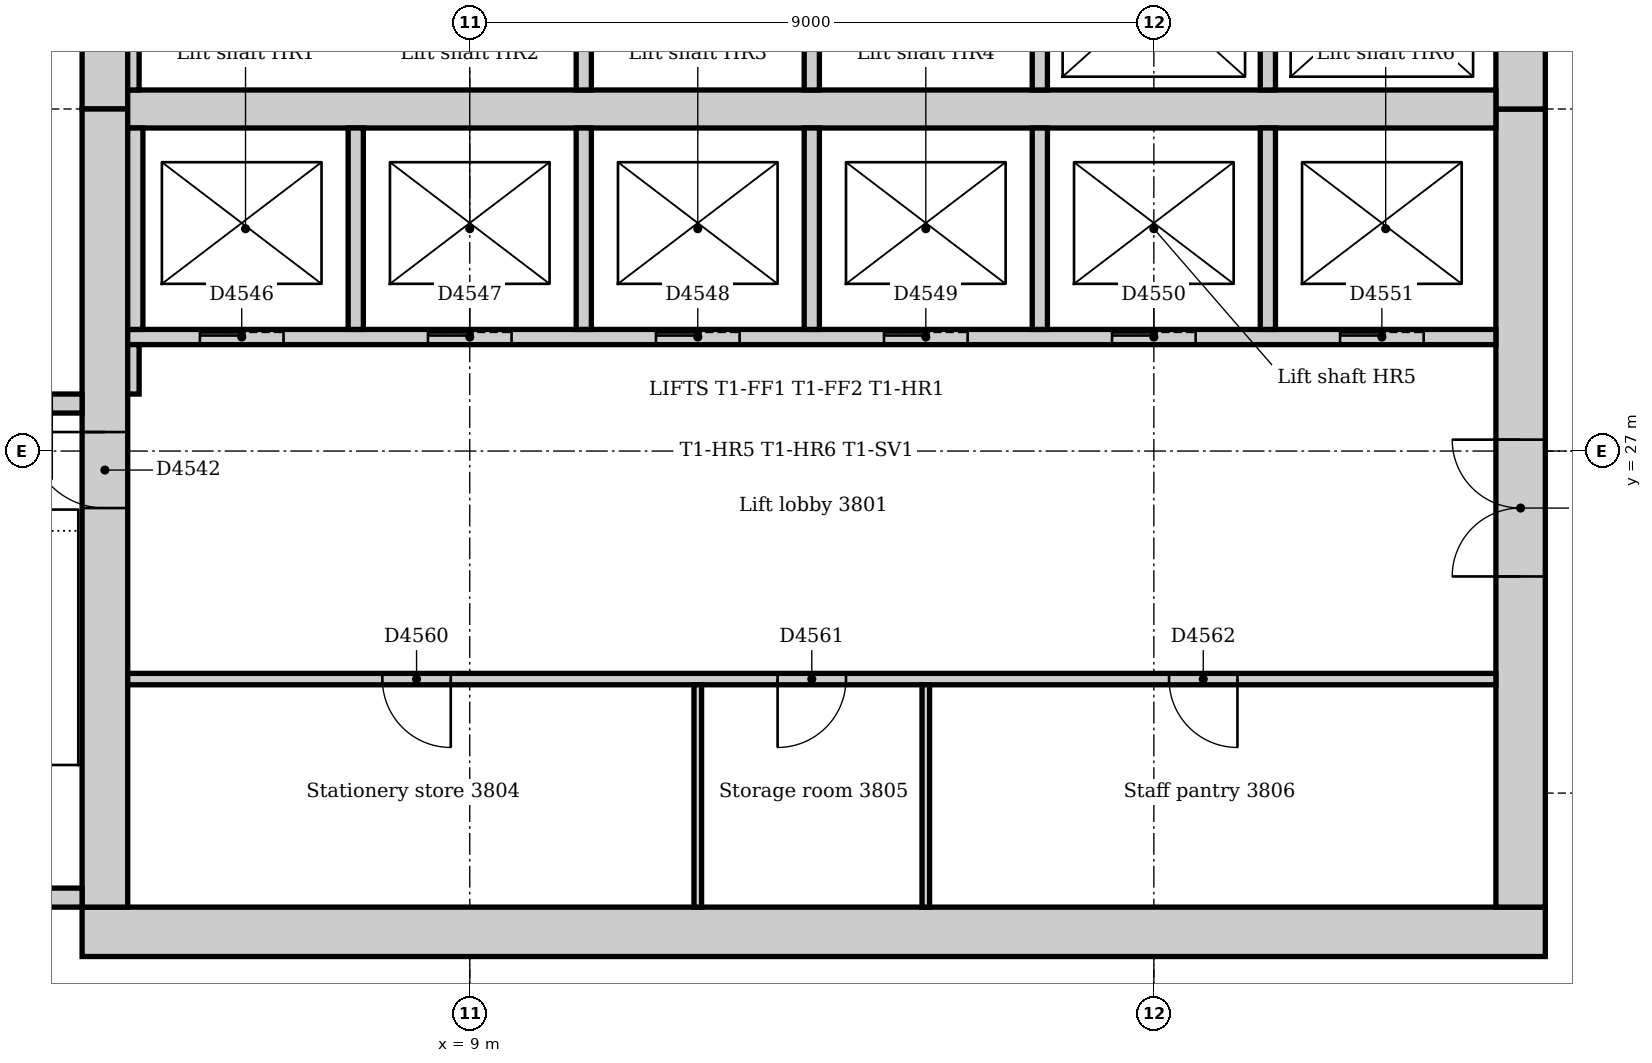
"""IFC4 building model, lengths in metres.
Left out: names, types, materials, properties, quantities, classifications, styles, units other than length and angle.
Written with IfcOpenShell. Run it as: python <this file> out.ifc"""

import sys

from ifc_helpers import new_model, si_unit, direction, frame, frame_2d, origin, place, context, subcontext, project, spatial, rectangle, extrude, element, fill, save


model = new_model("IFC4")
c1 = context("Model", 3, precision=1e-05, world=origin(), true_north=direction((0.0, 1.0)))
c2 = subcontext(c1, "Body", "Model", "MODEL_VIEW")
j1 = project(units=[si_unit("LENGTHUNIT", "METRE"), si_unit("PLANEANGLEUNIT", "RADIAN")], contexts=[c1])
p1 = place(None, origin())
s1 = spatial("IfcSite", under=j1, at=p1, CompositionType="ELEMENT")
p2 = place(p1, origin())
s2 = spatial("IfcBuilding", under=s1, at=p2, CompositionType="ELEMENT")
p3 = place(p2, frame((0.0, 0.0, 161.0)))
s3 = spatial("IfcBuildingStorey", under=s2, at=p3, CompositionType="ELEMENT", Elevation=161.0)
p4 = place(p3, frame((3.9, 20.675, 0.0), z_axis=(0.0, 0.0, 1.0), x_axis=(1.0, 0.0, 0.0)))
e1 = element("IfcWall", 1, at=p4, inside=s3, PredefinedType="SOLIDWALL", context=c2, shape_type="SweptSolid", body=[
    extrude(rectangle(XDim=19.25, YDim=0.65, at=frame_2d((9.625, 0.0))), origin(), (0.0, 0.0, 1.0), 4.0),
])
p5 = place(p3, frame((22.825, 21.0, 0.0), z_axis=(0.0, 0.0, 1.0), x_axis=(0.0, 1.0, 0.0)))
e2 = element("IfcWall", 2, at=p5, inside=s3, PredefinedType="SOLIDWALL", context=c2, shape_type="SweptSolid", body=[
    extrude(rectangle(XDim=10.5, YDim=0.65, at=frame_2d((5.25, 0.0))), origin(), (0.0, 0.0, 1.0), 4.0),
])
p6 = place(p5, frame((4.35, 0.0, 0.0)))
e3 = element("IfcOpeningElement", 3, at=p6, cuts=e2, PredefinedType="OPENING", context=c2, shape_type="SweptSolid", body=[
    extrude(rectangle(XDim=1.8, YDim=2.1, at=frame_2d((0.9, 1.05))), frame((0.0, 0.335, 0.0), z_axis=(0.0, -1.0, 0.0), x_axis=(1.0, 0.0, 0.0)), (0.0, 0.0, 1.0), 0.67),
])
p7 = place(p3, frame((22.825, 31.5, 0.0), z_axis=(0.0, 0.0, 1.0), x_axis=(0.0, 1.0, 0.0)))
e4 = element("IfcWall", 4, at=p7, inside=s3, PredefinedType="SOLIDWALL", context=c2, shape_type="SweptSolid", body=[
    extrude(rectangle(XDim=10.5, YDim=0.65, at=frame_2d((5.25, 0.0))), origin(), (0.0, 0.0, 1.0), 4.0),
])
p8 = place(p7, frame((3.15, 0.0, 0.0)))
e5 = element("IfcOpeningElement", 5, at=p8, cuts=e4, PredefinedType="OPENING", context=c2, shape_type="SweptSolid", body=[
    extrude(rectangle(XDim=1.0, YDim=2.1, at=frame_2d((0.5, 1.05))), frame((0.0, 0.335, 0.0), z_axis=(0.0, -1.0, 0.0), x_axis=(1.0, 0.0, 0.0)), (0.0, 0.0, 1.0), 0.67),
])
p9 = place(p7, frame((5.2, 0.0, 0.0)))
e6 = element("IfcOpeningElement", 6, at=p9, cuts=e4, PredefinedType="OPENING", context=c2, shape_type="SweptSolid", body=[
    extrude(rectangle(XDim=1.0, YDim=2.1, at=frame_2d((0.5, 1.05))), frame((0.0, 0.335, 0.0), z_axis=(0.0, -1.0, 0.0), x_axis=(1.0, 0.0, 0.0)), (0.0, 0.0, 1.0), 0.67),
])
p10 = place(p3, frame((4.2, 42.0, 0.0), z_axis=(0.0, 0.0, 1.0), x_axis=(0.0, -1.0, 0.0)))
e7 = element("IfcWall", 7, at=p10, inside=s3, PredefinedType="SOLIDWALL", context=c2, shape_type="SweptSolid", body=[
    extrude(rectangle(XDim=10.5, YDim=0.6, at=frame_2d((5.25, 0.0))), origin(), (0.0, 0.0, 1.0), 4.0),
])
p11 = place(p10, frame((5.3, 0.0, 0.0)))
e8 = element("IfcOpeningElement", 8, at=p11, cuts=e7, PredefinedType="OPENING", context=c2, shape_type="SweptSolid", body=[
    extrude(rectangle(XDim=1.0, YDim=2.1, at=frame_2d((0.5, 1.05))), frame((0.0, 0.31, 0.0), z_axis=(0.0, -1.0, 0.0), x_axis=(1.0, 0.0, 0.0)), (0.0, 0.0, 1.0), 0.62),
])
p12 = place(p3, frame((4.2, 31.5, 0.0), z_axis=(0.0, 0.0, 1.0), x_axis=(0.0, -1.0, 0.0)))
e9 = element("IfcWall", 9, at=p12, inside=s3, PredefinedType="SOLIDWALL", context=c2, shape_type="SweptSolid", body=[
    extrude(rectangle(XDim=10.5, YDim=0.6, at=frame_2d((5.25, 0.0))), origin(), (0.0, 0.0, 1.0), 4.0),
])
p13 = place(p12, frame((4.25, 0.0, 0.0)))
e10 = element("IfcOpeningElement", 10, at=p13, cuts=e9, PredefinedType="OPENING", context=c2, shape_type="SweptSolid", body=[
    extrude(rectangle(XDim=1.0, YDim=2.1, at=frame_2d((0.5, 1.05))), frame((0.0, 0.31, 0.0), z_axis=(0.0, -1.0, 0.0), x_axis=(1.0, 0.0, 0.0)), (0.0, 0.0, 1.0), 0.62),
])
p14 = place(p3, frame((4.5, 31.5, 0.0), z_axis=(0.0, 0.0, 1.0), x_axis=(1.0, 0.0, 0.0)))
e11 = element("IfcWall", 11, at=p14, inside=s3, PredefinedType="SOLIDWALL", context=c2, shape_type="SweptSolid", body=[
    extrude(rectangle(XDim=18.0, YDim=0.5, at=frame_2d((9.0, 0.0))), origin(), (0.0, 0.0, 1.0), 4.0),
])
p15 = place(p3, frame((0.36, 21.125, 0.0), z_axis=(0.0, 0.0, 1.0), x_axis=(1.0, 0.0, 0.0)))
e12 = element("IfcWall", 12, at=p15, inside=s3, PredefinedType="SOLIDWALL", context=c2, shape_type="SweptSolid", body=[
    extrude(rectangle(XDim=3.54, YDim=0.25, at=frame_2d((1.77, 0.0))), origin(), (0.0, 0.0, 1.0), 4.0),
])
p16 = place(p3, frame((3.9, 27.625, 0.0), z_axis=(0.0, 0.0, 1.0), x_axis=(-1.0, 0.0, 0.0)))
e13 = element("IfcWall", 13, at=p16, inside=s3, PredefinedType="SOLIDWALL", context=c2, shape_type="SweptSolid", body=[
    extrude(rectangle(XDim=3.54, YDim=0.25, at=frame_2d((1.77, 0.0))), origin(), (0.0, 0.0, 1.0), 4.0),
])
p17 = place(p16, frame((0.4, 0.0, 0.0)))
e14 = element("IfcOpeningElement", 14, at=p17, cuts=e13, PredefinedType="OPENING", context=c2, shape_type="SweptSolid", body=[
    extrude(rectangle(XDim=1.0, YDim=2.1, at=frame_2d((0.5, 1.05))), frame((0.0, 0.135, 0.0), z_axis=(0.0, -1.0, 0.0), x_axis=(1.0, 0.0, 0.0)), (0.0, 0.0, 1.0), 0.27),
])
p18 = place(p3, frame((4.5, 28.5, 0.0), z_axis=(0.0, 0.0, 1.0), x_axis=(1.0, 0.0, 0.0)))
e15 = element("IfcWall", 15, at=p18, inside=s3, PredefinedType="PARTITIONING", context=c2, shape_type="SweptSolid", body=[
    extrude(rectangle(XDim=18.0, YDim=0.2, at=frame_2d((9.0, 0.0))), origin(), (0.0, 0.0, 1.0), 3.85),
])
p19 = place(p18, frame((0.95, 0.0, 0.0)))
e16 = element("IfcOpeningElement", 16, at=p19, cuts=e15, PredefinedType="OPENING", context=c2, shape_type="SweptSolid", body=[
    extrude(rectangle(XDim=1.1, YDim=2.1, at=frame_2d((0.55, 1.05))), frame((0.0, 0.11, 0.0), z_axis=(0.0, -1.0, 0.0), x_axis=(1.0, 0.0, 0.0)), (0.0, 0.0, 1.0), 0.22),
])
p20 = place(p18, frame((3.95, 0.0, 0.0)))
e17 = element("IfcOpeningElement", 17, at=p20, cuts=e15, PredefinedType="OPENING", context=c2, shape_type="SweptSolid", body=[
    extrude(rectangle(XDim=1.1, YDim=2.1, at=frame_2d((0.55, 1.05))), frame((0.0, 0.11, 0.0), z_axis=(0.0, -1.0, 0.0), x_axis=(1.0, 0.0, 0.0)), (0.0, 0.0, 1.0), 0.22),
])
p21 = place(p18, frame((6.95, 0.0, 0.0)))
e18 = element("IfcOpeningElement", 18, at=p21, cuts=e15, PredefinedType="OPENING", context=c2, shape_type="SweptSolid", body=[
    extrude(rectangle(XDim=1.1, YDim=2.1, at=frame_2d((0.55, 1.05))), frame((0.0, 0.11, 0.0), z_axis=(0.0, -1.0, 0.0), x_axis=(1.0, 0.0, 0.0)), (0.0, 0.0, 1.0), 0.22),
])
p22 = place(p18, frame((9.95, 0.0, 0.0)))
e19 = element("IfcOpeningElement", 19, at=p22, cuts=e15, PredefinedType="OPENING", context=c2, shape_type="SweptSolid", body=[
    extrude(rectangle(XDim=1.1, YDim=2.1, at=frame_2d((0.55, 1.05))), frame((0.0, 0.11, 0.0), z_axis=(0.0, -1.0, 0.0), x_axis=(1.0, 0.0, 0.0)), (0.0, 0.0, 1.0), 0.22),
])
p23 = place(p18, frame((12.95, 0.0, 0.0)))
e20 = element("IfcOpeningElement", 20, at=p23, cuts=e15, PredefinedType="OPENING", context=c2, shape_type="SweptSolid", body=[
    extrude(rectangle(XDim=1.1, YDim=2.1, at=frame_2d((0.55, 1.05))), frame((0.0, 0.11, 0.0), z_axis=(0.0, -1.0, 0.0), x_axis=(1.0, 0.0, 0.0)), (0.0, 0.0, 1.0), 0.22),
])
p24 = place(p18, frame((15.95, 0.0, 0.0)))
e21 = element("IfcOpeningElement", 21, at=p24, cuts=e15, PredefinedType="OPENING", context=c2, shape_type="SweptSolid", body=[
    extrude(rectangle(XDim=1.1, YDim=2.1, at=frame_2d((0.55, 1.05))), frame((0.0, 0.11, 0.0), z_axis=(0.0, -1.0, 0.0), x_axis=(1.0, 0.0, 0.0)), (0.0, 0.0, 1.0), 0.22),
])
for number, where, z_axis, x_axis in (
    (22, (10.5, 28.6, 0.0), (0.0, 0.0, 1.0), (0.0, 1.0, 0.0)),
    (23, (10.5, 31.75, 0.0), (0.0, 0.0, 1.0), (0.0, 1.0, 0.0)),
    (24, (13.5, 28.6, 0.0), (0.0, 0.0, 1.0), (0.0, 1.0, 0.0)),
    (25, (13.5, 31.75, 0.0), (0.0, 0.0, 1.0), (0.0, 1.0, 0.0)),
    (26, (16.5, 28.6, 0.0), (0.0, 0.0, 1.0), (0.0, 1.0, 0.0)),
    (27, (16.5, 31.75, 0.0), (0.0, 0.0, 1.0), (0.0, 1.0, 0.0)),
    (28, (19.5, 28.6, 0.0), (0.0, 0.0, 1.0), (0.0, 1.0, 0.0)),
    (29, (19.5, 31.75, 0.0), (0.0, 0.0, 1.0), (0.0, 1.0, 0.0)),
    (30, (4.6, 28.6, 0.0), (0.0, 0.0, 1.0), (0.0, 1.0, 0.0)),
    (31, (7.5, 28.6, 0.0), (0.0, 0.0, 1.0), (0.0, 1.0, 0.0)),
):
    element("IfcWall", number, at=place(p3, frame(where, z_axis=z_axis, x_axis=x_axis)), inside=s3, PredefinedType="PARTITIONING", context=c2, shape_type="SweptSolid", body=[
        extrude(rectangle(XDim=2.65, YDim=0.2, at=frame_2d((1.325, 0.0))), origin(), (0.0, 0.0, 1.0), 3.85),
    ])
p25 = place(p3, frame((4.5, 24.0, 0.0), z_axis=(0.0, 0.0, 1.0), x_axis=(1.0, 0.0, 0.0)))
e32 = element("IfcWall", 32, at=p25, inside=s3, PredefinedType="PARTITIONING", context=c2, shape_type="SweptSolid", body=[
    extrude(rectangle(XDim=18.0, YDim=0.15, at=frame_2d((9.0, 0.0))), origin(), (0.0, 0.0, 1.0), 3.85),
])
p26 = place(p25, frame((3.35, 0.0, 0.0)))
e33 = element("IfcOpeningElement", 33, at=p26, cuts=e32, PredefinedType="OPENING", context=c2, shape_type="SweptSolid", body=[
    extrude(rectangle(XDim=0.9, YDim=2.1, at=frame_2d((0.45, 1.05))), frame((0.0, 0.085, 0.0), z_axis=(0.0, -1.0, 0.0), x_axis=(1.0, 0.0, 0.0)), (0.0, 0.0, 1.0), 0.17),
])
p27 = place(p25, frame((8.55, 0.0, 0.0)))
e34 = element("IfcOpeningElement", 34, at=p27, cuts=e32, PredefinedType="OPENING", context=c2, shape_type="SweptSolid", body=[
    extrude(rectangle(XDim=0.9, YDim=2.1, at=frame_2d((0.45, 1.05))), frame((0.0, 0.085, 0.0), z_axis=(0.0, -1.0, 0.0), x_axis=(1.0, 0.0, 0.0)), (0.0, 0.0, 1.0), 0.17),
])
p28 = place(p25, frame((13.7, 0.0, 0.0)))
e35 = element("IfcOpeningElement", 35, at=p28, cuts=e32, PredefinedType="OPENING", context=c2, shape_type="SweptSolid", body=[
    extrude(rectangle(XDim=0.9, YDim=2.1, at=frame_2d((0.45, 1.05))), frame((0.0, 0.085, 0.0), z_axis=(0.0, -1.0, 0.0), x_axis=(1.0, 0.0, 0.0)), (0.0, 0.0, 1.0), 0.17),
])
p29 = place(p3, frame((4.575, 31.75, 0.0), z_axis=(0.0, 0.0, 1.0), x_axis=(0.0, 1.0, 0.0)))
e36 = element("IfcWall", 36, at=p29, inside=s3, PredefinedType="PARTITIONING", context=c2, shape_type="SweptSolid", body=[
    extrude(rectangle(XDim=2.675, YDim=0.15, at=frame_2d((1.337, 0.0))), origin(), (0.0, 0.0, 1.0), 3.85),
])
p30 = place(p3, frame((4.575, 27.75, 0.0), z_axis=(0.0, 0.0, 1.0), x_axis=(0.0, 1.0, 0.0)))
e37 = element("IfcWall", 37, at=p30, inside=s3, PredefinedType="PARTITIONING", context=c2, shape_type="SweptSolid", body=[
    extrude(rectangle(XDim=0.65, YDim=0.15, at=frame_2d((0.325, 0.0))), origin(), (0.0, 0.0, 1.0), 3.85),
])
for number, where, z_axis, x_axis in (
    (38, (12.0, 21.0, 0.0), (0.0, 0.0, 1.0), (0.0, 1.0, 0.0)),
    (39, (15.0, 21.0, 0.0), (0.0, 0.0, 1.0), (0.0, 1.0, 0.0)),
):
    element("IfcWall", number, at=place(p3, frame(where, z_axis=z_axis, x_axis=x_axis)), inside=s3, PredefinedType="PARTITIONING", context=c2, shape_type="SweptSolid", body=[
        extrude(rectangle(XDim=2.925, YDim=0.1, at=frame_2d((1.462, 0.0))), origin(), (0.0, 0.0, 1.0), 3.85),
    ])
p31 = place(p13, frame((1.0, 0.0, 0.0), z_axis=(0.0, 0.0, 1.0), x_axis=(-1.0, 0.0, 0.0)))
e40 = element("IfcDoor", 40, at=p31, inside=s3, OperationType="SINGLE_SWING_RIGHT", PredefinedType="DOOR", context=c2, shape_type="SweptSolid", body=[
    extrude(rectangle(XDim=1.0, YDim=2.1, at=frame_2d((0.5, 1.05))), frame((0.0, 0.025, 0.0), z_axis=(0.0, -1.0, 0.0), x_axis=(1.0, 0.0, 0.0)), (0.0, 0.0, 1.0), 0.05),
])
fill(e10, e40)
p32 = place(p19, origin())
e41 = element("IfcDoor", 41, at=p32, inside=s3, OperationType="SLIDING_TO_LEFT", PredefinedType="DOOR", context=c2, shape_type="SweptSolid", body=[
    extrude(rectangle(XDim=1.1, YDim=2.1, at=frame_2d((0.55, 1.05))), frame((0.0, 0.025, 0.0), z_axis=(0.0, -1.0, 0.0), x_axis=(1.0, 0.0, 0.0)), (0.0, 0.0, 1.0), 0.05),
])
fill(e16, e41)
p33 = place(p20, origin())
e42 = element("IfcDoor", 42, at=p33, inside=s3, OperationType="SLIDING_TO_LEFT", PredefinedType="DOOR", context=c2, shape_type="SweptSolid", body=[
    extrude(rectangle(XDim=1.1, YDim=2.1, at=frame_2d((0.55, 1.05))), frame((0.0, 0.025, 0.0), z_axis=(0.0, -1.0, 0.0), x_axis=(1.0, 0.0, 0.0)), (0.0, 0.0, 1.0), 0.05),
])
fill(e17, e42)
p34 = place(p21, origin())
e43 = element("IfcDoor", 43, at=p34, inside=s3, OperationType="SLIDING_TO_LEFT", PredefinedType="DOOR", context=c2, shape_type="SweptSolid", body=[
    extrude(rectangle(XDim=1.1, YDim=2.1, at=frame_2d((0.55, 1.05))), frame((0.0, 0.025, 0.0), z_axis=(0.0, -1.0, 0.0), x_axis=(1.0, 0.0, 0.0)), (0.0, 0.0, 1.0), 0.05),
])
fill(e18, e43)
p35 = place(p22, origin())
e44 = element("IfcDoor", 44, at=p35, inside=s3, OperationType="SLIDING_TO_LEFT", PredefinedType="DOOR", context=c2, shape_type="SweptSolid", body=[
    extrude(rectangle(XDim=1.1, YDim=2.1, at=frame_2d((0.55, 1.05))), frame((0.0, 0.025, 0.0), z_axis=(0.0, -1.0, 0.0), x_axis=(1.0, 0.0, 0.0)), (0.0, 0.0, 1.0), 0.05),
])
fill(e19, e44)
p36 = place(p23, origin())
e45 = element("IfcDoor", 45, at=p36, inside=s3, OperationType="SLIDING_TO_LEFT", PredefinedType="DOOR", context=c2, shape_type="SweptSolid", body=[
    extrude(rectangle(XDim=1.1, YDim=2.1, at=frame_2d((0.55, 1.05))), frame((0.0, 0.025, 0.0), z_axis=(0.0, -1.0, 0.0), x_axis=(1.0, 0.0, 0.0)), (0.0, 0.0, 1.0), 0.05),
])
fill(e20, e45)
p37 = place(p24, origin())
e46 = element("IfcDoor", 46, at=p37, inside=s3, OperationType="SLIDING_TO_LEFT", PredefinedType="DOOR", context=c2, shape_type="SweptSolid", body=[
    extrude(rectangle(XDim=1.1, YDim=2.1, at=frame_2d((0.55, 1.05))), frame((0.0, 0.025, 0.0), z_axis=(0.0, -1.0, 0.0), x_axis=(1.0, 0.0, 0.0)), (0.0, 0.0, 1.0), 0.05),
])
fill(e21, e46)
p38 = place(p6, origin())
e47 = element("IfcDoor", 47, at=p38, inside=s3, OperationType="DOUBLE_DOOR_DOUBLE_SWING", PredefinedType="DOOR", context=c2, shape_type="SweptSolid", body=[
    extrude(rectangle(XDim=1.8, YDim=2.1, at=frame_2d((0.9, 1.05))), frame((0.0, 0.025, 0.0), z_axis=(0.0, -1.0, 0.0), x_axis=(1.0, 0.0, 0.0)), (0.0, 0.0, 1.0), 0.05),
])
fill(e3, e47)
p39 = place(p26, frame((0.9, 0.0, 0.0), z_axis=(0.0, 0.0, 1.0), x_axis=(-1.0, 0.0, 0.0)))
e48 = element("IfcDoor", 48, at=p39, inside=s3, OperationType="SINGLE_SWING_LEFT", PredefinedType="DOOR", context=c2, shape_type="SweptSolid", body=[
    extrude(rectangle(XDim=0.9, YDim=2.1, at=frame_2d((0.45, 1.05))), frame((0.0, 0.025, 0.0), z_axis=(0.0, -1.0, 0.0), x_axis=(1.0, 0.0, 0.0)), (0.0, 0.0, 1.0), 0.05),
])
fill(e33, e48)
p40 = place(p27, frame((0.9, 0.0, 0.0), z_axis=(0.0, 0.0, 1.0), x_axis=(-1.0, 0.0, 0.0)))
e49 = element("IfcDoor", 49, at=p40, inside=s3, OperationType="SINGLE_SWING_RIGHT", PredefinedType="DOOR", context=c2, shape_type="SweptSolid", body=[
    extrude(rectangle(XDim=0.9, YDim=2.1, at=frame_2d((0.45, 1.05))), frame((0.0, 0.025, 0.0), z_axis=(0.0, -1.0, 0.0), x_axis=(1.0, 0.0, 0.0)), (0.0, 0.0, 1.0), 0.05),
])
fill(e34, e49)
p41 = place(p28, frame((0.9, 0.0, 0.0), z_axis=(0.0, 0.0, 1.0), x_axis=(-1.0, 0.0, 0.0)))
e50 = element("IfcDoor", 50, at=p41, inside=s3, OperationType="SINGLE_SWING_LEFT", PredefinedType="DOOR", context=c2, shape_type="SweptSolid", body=[
    extrude(rectangle(XDim=0.9, YDim=2.1, at=frame_2d((0.45, 1.05))), frame((0.0, 0.025, 0.0), z_axis=(0.0, -1.0, 0.0), x_axis=(1.0, 0.0, 0.0)), (0.0, 0.0, 1.0), 0.05),
])
fill(e35, e50)
save(model, sys.argv[1])
